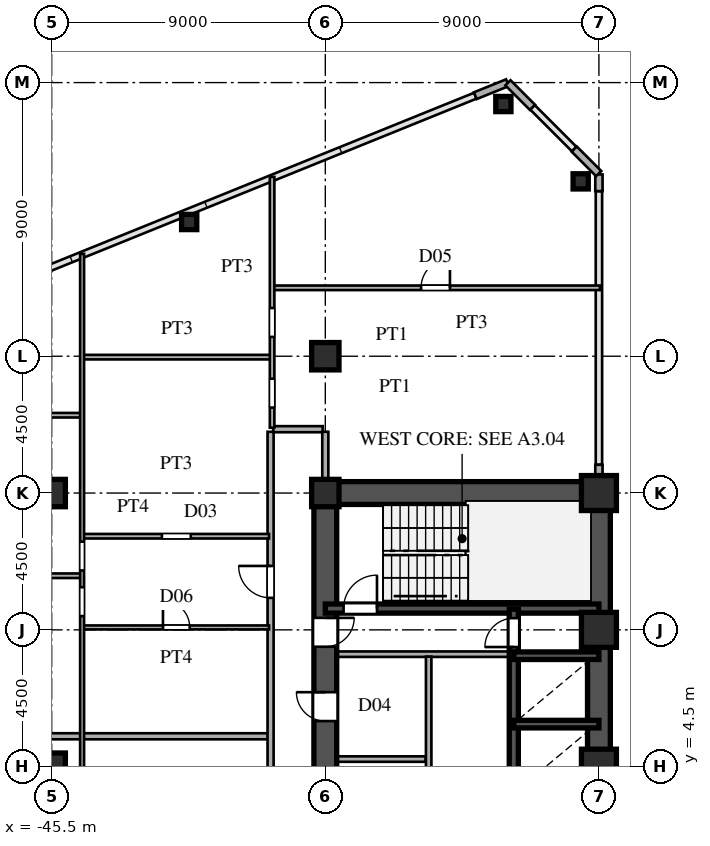
"""IFC4 building model, lengths in metres.
Left out: names, types, materials, properties, quantities, classifications, styles, units other than length and angle.
Written with IfcOpenShell. Run it as: python <this file> out.ifc"""

import sys

from ifc_helpers import new_model, si_unit, direction, frame, frame_2d, origin, origin_2d, place, context, subcontext, project, spatial, rectangle, hollow_rectangle, i_section, extrude, source, transform, mapped, element, fill, save


model = new_model("IFC4")
c1 = context("Model", 3, precision=1e-05, world=origin(), true_north=direction((0.0, 1.0)))
c2 = subcontext(c1, "Body", "Model", "MODEL_VIEW")
j1 = project(units=[si_unit("LENGTHUNIT", "METRE"), si_unit("PLANEANGLEUNIT", "RADIAN")], contexts=[c1])
p1 = place(None, origin())
s1 = spatial("IfcSite", under=j1, at=p1, CompositionType="ELEMENT")
p2 = place(p1, origin())
s2 = spatial("IfcBuilding", under=s1, at=p2, CompositionType="ELEMENT")
p3 = place(p2, frame((0.0, 0.0, 47.7)))
s3 = spatial("IfcBuildingStorey", under=s2, at=p3, CompositionType="ELEMENT", Elevation=47.7)
m1 = source(origin(), c2, "Body", "SweptSolid", [
    extrude(hollow_rectangle(XDim=1.15, YDim=1.15, WallThickness=0.048, at=origin_2d()), origin(), (0.0, 0.0, 1.0), 3.6),
])
for number, where, z_axis, x_axis in (
    (1, (-27.5, 4.5, 0.0), (0.0, 0.0, 1.0), (1.0, 0.0, 0.0)),
    (2, (-27.5, 9.0, 0.0), (0.0, 0.0, 1.0), (1.0, 0.0, 0.0)),
    (3, (-27.5, 13.5, 0.0), (0.0, 0.0, 1.0), (1.0, 0.0, 0.0)),
):
    element("IfcColumn", number, at=place(p3, frame(where, z_axis=z_axis, x_axis=x_axis)), inside=s3, PredefinedType="COLUMN", context=c2, shape_type="MappedRepresentation", body=[
        mapped(m1, transform((0.0, 0.0, 0.0), scale=1.0)),
    ])
m2 = source(origin(), c2, "Body", "SweptSolid", [
    extrude(i_section(OverallWidth=0.9, OverallDepth=0.9, WebThickness=0.036, FlangeThickness=0.055, at=origin_2d()), origin(), (0.0, 0.0, 1.0), 3.6),
])
for number, where, z_axis, x_axis in (
    (4, (-36.5, 13.5, 0.0), (0.0, 0.0, 1.0), (1.0, 0.0, 0.0)),
    (5, (-36.5, 18.0, 0.0), (0.0, 0.0, 1.0), (1.0, 0.0, 0.0)),
    (6, (-45.5, 4.5, 0.0), (0.0, 0.0, 1.0), (1.0, 0.0, 0.0)),
    (7, (-45.5, 13.5, 0.0), (0.0, 0.0, 1.0), (1.0, 0.0, 0.0)),
):
    element("IfcColumn", number, at=place(p3, frame(where, z_axis=z_axis, x_axis=x_axis)), inside=s3, PredefinedType="COLUMN", context=c2, shape_type="MappedRepresentation", body=[
        mapped(m2, transform((0.0, 0.0, 0.0), scale=1.0)),
    ])
m3 = source(origin(), c2, "Body", "SweptSolid", [
    extrude(hollow_rectangle(XDim=0.5, YDim=0.5, WallThickness=0.02, at=origin_2d()), origin(), (0.0, 0.0, 1.0), 3.6),
])
for number, where, z_axis, x_axis in (
    (8, (-28.1, 23.751, 0.0), (0.0, 0.0, 1.0), (1.0, 0.0, 0.0)),
    (9, (-30.643, 26.295, 0.0), (0.0, 0.0, 1.0), (1.0, 0.0, 0.0)),
    (10, (-40.977, 22.414, 0.0), (0.0, 0.0, 1.0), (1.0, 0.0, 0.0)),
):
    element("IfcColumn", number, at=place(p3, frame(where, z_axis=z_axis, x_axis=x_axis)), inside=s3, PredefinedType="COLUMN", context=c2, shape_type="MappedRepresentation", body=[
        mapped(m3, transform((0.0, 0.0, 0.0), scale=1.0)),
    ])
p4 = place(p3, frame((-27.5, 13.88, 0.0), z_axis=(0.0, 0.0, 1.0), x_axis=(0.0, 1.0, 0.0)))
e11 = element("IfcWall", 11, at=p4, inside=s3, PredefinedType="SOLIDWALL", context=c2, shape_type="SweptSolid", body=[
    extrude(rectangle(XDim=0.55, YDim=0.24, at=frame_2d((0.275, 0.0))), origin(), (0.0, 0.0, 1.0), 2.88),
])
p5 = place(p3, frame((-27.5, 23.43, 0.0), z_axis=(0.0, 0.0, 1.0), x_axis=(0.0, 1.0, 0.0)))
e12 = element("IfcWall", 12, at=p5, inside=s3, PredefinedType="SOLIDWALL", context=c2, shape_type="SweptSolid", body=[
    extrude(rectangle(XDim=0.55, YDim=0.24, at=frame_2d((0.275, 0.0))), origin(), (0.0, 0.0, 1.0), 3.38),
])
for number, where, z_axis, x_axis in (
    (13, (-27.507, 24.007, 0.0), (0.0, 0.0, 1.0), (-0.707, 0.707, 0.0)),
    (14, (-29.687, 26.187, 0.0), (0.0, 0.0, 1.0), (-0.707, 0.707, 0.0)),
):
    element("IfcWall", number, at=place(p3, frame(where, z_axis=z_axis, x_axis=x_axis)), inside=s3, PredefinedType="SOLIDWALL", context=c2, shape_type="SweptSolid", body=[
        extrude(rectangle(XDim=1.14, YDim=0.24, at=frame_2d((0.57, 0.0))), origin(), (0.0, 0.0, 1.0), 3.38),
    ])
p6 = place(p3, frame((-30.509, 26.996, 0.0), z_axis=(0.0, 0.0, 1.0), x_axis=(-0.927007103665, -0.375043770452, 0.0)))
e15 = element("IfcWall", 15, at=p6, inside=s3, PredefinedType="SOLIDWALL", context=c2, shape_type="SweptSolid", body=[
    extrude(rectangle(XDim=1.14, YDim=0.24, at=frame_2d((0.57, 0.0))), origin(), (0.0, 0.0, 1.0), 3.38),
])
p7 = place(p3, frame((-27.5, 1.3, 0.0), z_axis=(0.0, 0.0, 1.0), x_axis=(0.0, 1.0, 0.0)))
e16 = element("IfcWall", 16, at=p7, inside=s3, PredefinedType="SHEAR", context=c2, shape_type="SweptSolid", body=[
    extrude(rectangle(XDim=12.2, YDim=0.75, at=frame_2d((6.1, 0.0))), origin(), (0.0, 0.0, 1.0), 3.38),
])
p8 = place(p3, frame((-36.5, 13.5, 0.0), z_axis=(0.0, 0.0, 1.0), x_axis=(1.0, 0.0, 0.0)))
e17 = element("IfcWall", 17, at=p8, inside=s3, PredefinedType="SHEAR", context=c2, shape_type="SweptSolid", body=[
    extrude(rectangle(XDim=9.0, YDim=0.75, at=frame_2d((4.5, 0.0))), origin(), (0.0, 0.0, 1.0), 3.38),
])
p9 = place(p3, frame((-36.5, 8.2, 0.0), z_axis=(0.0, 0.0, 1.0), x_axis=(0.0, 1.0, 0.0)))
e18 = element("IfcWall", 18, at=p9, inside=s3, PredefinedType="SHEAR", context=c2, shape_type="SweptSolid", body=[
    extrude(rectangle(XDim=5.45, YDim=0.75, at=frame_2d((2.725, 0.0))), origin(), (0.0, 0.0, 1.0), 3.38),
])
p10 = place(p9, frame((0.245, 0.0, 0.0)))
e19 = element("IfcOpeningElement", 19, at=p10, cuts=e18, PredefinedType="OPENING", context=c2, shape_type="SweptSolid", body=[
    extrude(rectangle(XDim=0.95, YDim=2.15, at=frame_2d((0.475, 1.075))), frame((0.0, 0.385, 0.0), z_axis=(0.0, -1.0, 0.0), x_axis=(1.0, 0.0, 0.0)), (0.0, 0.0, 1.0), 0.77),
])
p11 = place(p3, frame((-36.5, 1.3, 0.0), z_axis=(0.0, 0.0, 1.0), x_axis=(0.0, 1.0, 0.0)))
e20 = element("IfcWall", 20, at=p11, inside=s3, PredefinedType="SHEAR", context=c2, shape_type="SweptSolid", body=[
    extrude(rectangle(XDim=3.45, YDim=0.75, at=frame_2d((1.725, 0.0))), origin(), (0.0, 0.0, 1.0), 3.38),
])
p12 = place(p11, frame((1.25, 0.0, 0.0)))
e21 = element("IfcOpeningElement", 21, at=p12, cuts=e20, PredefinedType="OPENING", context=c2, shape_type="SweptSolid", body=[
    extrude(rectangle(XDim=0.95, YDim=2.15, at=frame_2d((0.475, 1.075))), frame((0.0, 0.385, 0.0), z_axis=(0.0, -1.0, 0.0), x_axis=(1.0, 0.0, 0.0)), (0.0, 0.0, 1.0), 0.77),
])
p13 = place(p3, frame((-36.5, 4.75, 0.0), z_axis=(0.0, 0.0, 1.0), x_axis=(0.0, 1.0, 0.0)))
e22 = element("IfcWall", 22, at=p13, inside=s3, PredefinedType="SHEAR", context=c2, shape_type="SweptSolid", body=[
    extrude(rectangle(XDim=3.45, YDim=0.75, at=frame_2d((1.725, 0.0))), origin(), (0.0, 0.0, 1.0), 3.38),
])
p14 = place(p13, frame((1.25, 0.0, 0.0)))
e23 = element("IfcOpeningElement", 23, at=p14, cuts=e22, PredefinedType="OPENING", context=c2, shape_type="SweptSolid", body=[
    extrude(rectangle(XDim=0.95, YDim=2.15, at=frame_2d((0.475, 1.075))), frame((0.0, 0.385, 0.0), z_axis=(0.0, -1.0, 0.0), x_axis=(1.0, 0.0, 0.0)), (0.0, 0.0, 1.0), 0.77),
])
p15 = place(p3, frame((-36.5, 9.7, 0.0), z_axis=(0.0, 0.0, 1.0), x_axis=(1.0, 0.0, 0.0)))
e24 = element("IfcWall", 24, at=p15, inside=s3, PredefinedType="SHEAR", context=c2, shape_type="SweptSolid", body=[
    extrude(rectangle(XDim=9.0, YDim=0.3, at=frame_2d((4.5, 0.0))), origin(), (0.0, 0.0, 1.0), 3.38),
])
p16 = place(p15, frame((0.6, 0.0, 0.0)))
e25 = element("IfcOpeningElement", 25, at=p16, cuts=e24, PredefinedType="OPENING", context=c2, shape_type="SweptSolid", body=[
    extrude(rectangle(XDim=1.1, YDim=2.2, at=frame_2d((0.55, 1.1))), frame((0.0, 0.16, 0.0), z_axis=(0.0, -1.0, 0.0), x_axis=(1.0, 0.0, 0.0)), (0.0, 0.0, 1.0), 0.32),
])
for number, where, z_axis, x_axis in (
    (26, (-30.3, 5.9, 0.0), (0.0, 0.0, 1.0), (1.0, 0.0, 0.0)),
    (27, (-30.3, 8.15, 0.0), (0.0, 0.0, 1.0), (1.0, 0.0, 0.0)),
):
    element("IfcWall", number, at=place(p3, frame(where, z_axis=z_axis, x_axis=x_axis)), inside=s3, PredefinedType="SHEAR", context=c2, shape_type="SweptSolid", body=[
        extrude(rectangle(XDim=2.8, YDim=0.25, at=frame_2d((1.4, 0.0))), origin(), (0.0, 0.0, 1.0), 3.38),
    ])
p17 = place(p3, frame((-30.3, 3.6, 0.0), z_axis=(0.0, 0.0, 1.0), x_axis=(0.0, 1.0, 0.0)))
e28 = element("IfcWall", 28, at=p17, inside=s3, PredefinedType="SHEAR", context=c2, shape_type="SweptSolid", body=[
    extrude(rectangle(XDim=2.3, YDim=0.3, at=frame_2d((1.15, 0.0))), origin(), (0.0, 0.0, 1.0), 3.38),
])
p18 = place(p3, frame((-30.3, 5.9, 0.0), z_axis=(0.0, 0.0, 1.0), x_axis=(0.0, 1.0, 0.0)))
e29 = element("IfcWall", 29, at=p18, inside=s3, PredefinedType="SHEAR", context=c2, shape_type="SweptSolid", body=[
    extrude(rectangle(XDim=2.25, YDim=0.3, at=frame_2d((1.125, 0.0))), origin(), (0.0, 0.0, 1.0), 3.38),
])
p19 = place(p3, frame((-30.3, 8.15, 0.0), z_axis=(0.0, 0.0, 1.0), x_axis=(0.0, 1.0, 0.0)))
e30 = element("IfcWall", 30, at=p19, inside=s3, PredefinedType="SHEAR", context=c2, shape_type="SweptSolid", body=[
    extrude(rectangle(XDim=1.53, YDim=0.3, at=frame_2d((0.765, 0.0))), origin(), (0.0, 0.0, 1.0), 3.38),
])
p20 = place(p19, frame((0.285, 0.0, 0.0)))
e31 = element("IfcOpeningElement", 31, at=p20, cuts=e30, PredefinedType="OPENING", context=c2, shape_type="SweptSolid", body=[
    extrude(rectangle(XDim=0.95, YDim=2.15, at=frame_2d((0.475, 1.075))), frame((0.0, 0.16, 0.0), z_axis=(0.0, -1.0, 0.0), x_axis=(1.0, 0.0, 0.0)), (0.0, 0.0, 1.0), 0.32),
])
p21 = place(p3, frame((-36.15, 8.2, 0.0), z_axis=(0.0, 0.0, 1.0), x_axis=(1.0, 0.0, 0.0)))
e32 = element("IfcWall", 32, at=p21, inside=s3, PredefinedType="PARTITIONING", context=c2, shape_type="SweptSolid", body=[
    extrude(rectangle(XDim=5.7, YDim=0.18, at=frame_2d((2.85, 0.0))), origin(), (0.0, 0.0, 1.0), 3.38),
])
p22 = place(p3, frame((-33.1, 1.38, 0.0), z_axis=(0.0, 0.0, 1.0), x_axis=(0.0, 1.0, 0.0)))
e33 = element("IfcWall", 33, at=p22, inside=s3, PredefinedType="PARTITIONING", context=c2, shape_type="SweptSolid", body=[
    extrude(rectangle(XDim=6.74, YDim=0.18, at=frame_2d((3.37, 0.0))), origin(), (0.0, 0.0, 1.0), 3.38),
])
p23 = place(p3, frame((-36.15, 4.75, 0.0), z_axis=(0.0, 0.0, 1.0), x_axis=(1.0, 0.0, 0.0)))
e34 = element("IfcWall", 34, at=p23, inside=s3, PredefinedType="PARTITIONING", context=c2, shape_type="SweptSolid", body=[
    extrude(rectangle(XDim=2.95, YDim=0.18, at=frame_2d((1.475, 0.0))), origin(), (0.0, 0.0, 1.0), 3.38),
])
p24 = place(p3, frame((-72.505, 5.5, 0.0), z_axis=(0.0, 0.0, 1.0), x_axis=(1.0, 0.0, 0.0)))
e35 = element("IfcWall", 35, at=p24, inside=s3, PredefinedType="PARTITIONING", context=c2, shape_type="SweptSolid", body=[
    extrude(rectangle(XDim=34.125, YDim=0.2, at=frame_2d((17.062, 0.0))), origin(), (0.0, 0.0, 1.0), 3.38),
])
p25 = place(p3, frame((-44.45, 9.08, 0.0), z_axis=(0.0, 0.0, 1.0), x_axis=(1.0, 0.0, 0.0)))
e36 = element("IfcWall", 36, at=p25, inside=s3, PredefinedType="PARTITIONING", context=c2, shape_type="SweptSolid", body=[
    extrude(rectangle(XDim=6.1, YDim=0.13, at=frame_2d((3.05, 0.0))), origin(), (0.0, 0.0, 1.0), 3.38),
])
p26 = place(p25, frame((2.61, 0.0, 0.0)))
e37 = element("IfcOpeningElement", 37, at=p26, cuts=e36, PredefinedType="OPENING", context=c2, shape_type="SweptSolid", body=[
    extrude(rectangle(XDim=0.88, YDim=2.1, at=frame_2d((0.44, 1.05))), frame((0.0, 0.075, 0.0), z_axis=(0.0, -1.0, 0.0), x_axis=(1.0, 0.0, 0.0)), (0.0, 0.0, 1.0), 0.15),
])
p27 = place(p3, frame((-70.613, 10.78, 0.0), z_axis=(0.0, 0.0, 1.0), x_axis=(1.0, 0.0, 0.0)))
e38 = element("IfcWall", 38, at=p27, inside=s3, PredefinedType="PARTITIONING", context=c2, shape_type="SweptSolid", body=[
    extrude(rectangle(XDim=26.063, YDim=0.15, at=frame_2d((13.031, 0.0))), origin(), (0.0, 0.0, 1.0), 3.38),
])
p28 = place(p27, frame((4.749, 0.0, 0.0)))
e39 = element("IfcOpeningElement", 39, at=p28, cuts=e38, PredefinedType="OPENING", context=c2, shape_type="SweptSolid", body=[
    extrude(rectangle(XDim=0.95, YDim=2.15, at=frame_2d((0.475, 1.075))), frame((0.0, 0.085, 0.0), z_axis=(0.0, -1.0, 0.0), x_axis=(1.0, 0.0, 0.0)), (0.0, 0.0, 1.0), 0.17),
])
p29 = place(p3, frame((-44.45, 12.08, 0.0), z_axis=(0.0, 0.0, 1.0), x_axis=(1.0, 0.0, 0.0)))
e40 = element("IfcWall", 40, at=p29, inside=s3, PredefinedType="PARTITIONING", context=c2, shape_type="SweptSolid", body=[
    extrude(rectangle(XDim=6.1, YDim=0.15, at=frame_2d((3.05, 0.0))), origin(), (0.0, 0.0, 1.0), 3.38),
])
p30 = place(p29, frame((2.575, 0.0, 0.0)))
e41 = element("IfcOpeningElement", 41, at=p30, cuts=e40, PredefinedType="OPENING", context=c2, shape_type="SweptSolid", body=[
    extrude(rectangle(XDim=0.95, YDim=2.15, at=frame_2d((0.475, 1.075))), frame((0.0, 0.085, 0.0), z_axis=(0.0, -1.0, 0.0), x_axis=(1.0, 0.0, 0.0)), (0.0, 0.0, 1.0), 0.17),
])
p31 = place(p3, frame((-38.215, 15.6, 0.0), z_axis=(0.0, 0.0, 1.0), x_axis=(1.0, 0.0, 0.0)))
e42 = element("IfcWall", 42, at=p31, inside=s3, PredefinedType="PARTITIONING", context=c2, shape_type="SweptSolid", body=[
    extrude(rectangle(XDim=1.63, YDim=0.2, at=frame_2d((0.815, 0.0))), origin(), (0.0, 0.0, 1.0), 3.38),
])
p32 = place(p3, frame((-54.45, 16.06, 0.0), z_axis=(0.0, 0.0, 1.0), x_axis=(1.0, 0.0, 0.0)))
e43 = element("IfcWall", 43, at=p32, inside=s3, PredefinedType="PARTITIONING", context=c2, shape_type="SweptSolid", body=[
    extrude(rectangle(XDim=9.9, YDim=0.15, at=frame_2d((4.95, 0.0))), origin(), (0.0, 0.0, 1.0), 3.38),
])
p33 = place(p32, frame((4.475, 0.0, 0.0)))
e44 = element("IfcOpeningElement", 44, at=p33, cuts=e43, PredefinedType="OPENING", context=c2, shape_type="SweptSolid", body=[
    extrude(rectangle(XDim=0.95, YDim=2.15, at=frame_2d((0.475, 1.075))), frame((0.0, 0.085, 0.0), z_axis=(0.0, -1.0, 0.0), x_axis=(1.0, 0.0, 0.0)), (0.0, 0.0, 1.0), 0.17),
])
p34 = place(p3, frame((-44.45, 17.97, 0.0), z_axis=(0.0, 0.0, 1.0), x_axis=(1.0, 0.0, 0.0)))
e45 = element("IfcWall", 45, at=p34, inside=s3, PredefinedType="PARTITIONING", context=c2, shape_type="SweptSolid", body=[
    extrude(rectangle(XDim=6.15, YDim=0.15, at=frame_2d((3.075, 0.0))), origin(), (0.0, 0.0, 1.0), 3.38),
])
p35 = place(p3, frame((-38.2, 20.25, 0.0), z_axis=(0.0, 0.0, 1.0), x_axis=(1.0, 0.0, 0.0)))
e46 = element("IfcWall", 46, at=p35, inside=s3, PredefinedType="PARTITIONING", context=c2, shape_type="SweptSolid", body=[
    extrude(rectangle(XDim=10.735, YDim=0.15, at=frame_2d((5.367, 0.0))), origin(), (0.0, 0.0, 1.0), 3.38),
])
p36 = place(p35, frame((4.85, 0.0, 0.0)))
e47 = element("IfcOpeningElement", 47, at=p36, cuts=e46, PredefinedType="OPENING", context=c2, shape_type="SweptSolid", body=[
    extrude(rectangle(XDim=0.95, YDim=2.15, at=frame_2d((0.475, 1.075))), frame((0.0, 0.085, 0.0), z_axis=(0.0, -1.0, 0.0), x_axis=(1.0, 0.0, 0.0)), (0.0, 0.0, 1.0), 0.17),
])
p37 = place(p3, frame((-44.5, 1.352, 0.0), z_axis=(0.0, 0.0, 1.0), x_axis=(0.0, 1.0, 0.0)))
e48 = element("IfcWall", 48, at=p37, inside=s3, PredefinedType="PARTITIONING", context=c2, shape_type="SweptSolid", body=[
    extrude(rectangle(XDim=20.016, YDim=0.13, at=frame_2d((10.008, 0.0))), origin(), (0.0, 0.0, 1.0), 3.38),
])
p38 = place(p37, frame((8.101, 0.0, 0.0)))
e49 = element("IfcOpeningElement", 49, at=p38, cuts=e48, PredefinedType="OPENING", context=c2, shape_type="SweptSolid", body=[
    extrude(rectangle(XDim=0.95, YDim=2.15, at=frame_2d((0.475, 1.075))), frame((0.0, 0.075, 0.0), z_axis=(0.0, -1.0, 0.0), x_axis=(1.0, 0.0, 0.0)), (0.0, 0.0, 1.0), 0.15),
])
p39 = place(p37, frame((9.601, 0.0, 0.0)))
e50 = element("IfcOpeningElement", 50, at=p39, cuts=e48, PredefinedType="OPENING", context=c2, shape_type="SweptSolid", body=[
    extrude(rectangle(XDim=0.95, YDim=2.15, at=frame_2d((0.475, 1.075))), frame((0.0, 0.075, 0.0), z_axis=(0.0, -1.0, 0.0), x_axis=(1.0, 0.0, 0.0)), (0.0, 0.0, 1.0), 0.15),
])
p40 = place(p3, frame((-38.3, -15.515, 0.0), z_axis=(0.0, 0.0, 1.0), x_axis=(0.0, 1.0, 0.0)))
e51 = element("IfcWall", 51, at=p40, inside=s3, PredefinedType="PARTITIONING", context=c2, shape_type="SweptSolid", body=[
    extrude(rectangle(XDim=31.03, YDim=0.2, at=frame_2d((15.515, 0.0))), origin(), (0.0, 0.0, 1.0), 3.38),
])
p41 = place(p40, frame((2.345, 0.0, 0.0)))
e52 = element("IfcOpeningElement", 52, at=p41, cuts=e51, PredefinedType="OPENING", context=c2, shape_type="SweptSolid", body=[
    extrude(rectangle(XDim=1.05, YDim=2.25, at=frame_2d((0.525, 1.125))), frame((0.0, 0.11, 0.0), z_axis=(0.0, -1.0, 0.0), x_axis=(1.0, 0.0, 0.0)), (0.0, 0.0, 1.0), 0.22),
])
p42 = place(p40, frame((13.28, 0.0, 0.0)))
e53 = element("IfcOpeningElement", 53, at=p42, cuts=e51, PredefinedType="OPENING", context=c2, shape_type="SweptSolid", body=[
    extrude(rectangle(XDim=1.05, YDim=2.25, at=frame_2d((0.525, 1.125))), frame((0.0, 0.11, 0.0), z_axis=(0.0, -1.0, 0.0), x_axis=(1.0, 0.0, 0.0)), (0.0, 0.0, 1.0), 0.22),
])
p43 = place(p40, frame((25.567, 0.0, 0.0)))
e54 = element("IfcOpeningElement", 54, at=p43, cuts=e51, PredefinedType="OPENING", context=c2, shape_type="SweptSolid", body=[
    extrude(rectangle(XDim=1.05, YDim=2.25, at=frame_2d((0.525, 1.125))), frame((0.0, 0.11, 0.0), z_axis=(0.0, -1.0, 0.0), x_axis=(1.0, 0.0, 0.0)), (0.0, 0.0, 1.0), 0.22),
])
p44 = place(p3, frame((-38.25, 15.65, 0.0), z_axis=(0.0, 0.0, 1.0), x_axis=(0.0, 1.0, 0.0)))
e55 = element("IfcWall", 55, at=p44, inside=s3, PredefinedType="PARTITIONING", context=c2, shape_type="SweptSolid", body=[
    extrude(rectangle(XDim=8.248, YDim=0.15, at=frame_2d((4.124, 0.0))), origin(), (0.0, 0.0, 1.0), 3.38),
])
p45 = place(p44, frame((0.66, 0.0, 0.0)))
e56 = element("IfcOpeningElement", 56, at=p45, cuts=e55, PredefinedType="OPENING", context=c2, shape_type="SweptSolid", body=[
    extrude(rectangle(XDim=0.95, YDim=2.15, at=frame_2d((0.475, 1.075))), frame((0.0, 0.085, 0.0), z_axis=(0.0, -1.0, 0.0), x_axis=(1.0, 0.0, 0.0)), (0.0, 0.0, 1.0), 0.17),
])
p46 = place(p44, frame((2.985, 0.0, 0.0)))
e57 = element("IfcOpeningElement", 57, at=p46, cuts=e55, PredefinedType="OPENING", context=c2, shape_type="SweptSolid", body=[
    extrude(rectangle(XDim=0.95, YDim=2.15, at=frame_2d((0.475, 1.075))), frame((0.0, 0.085, 0.0), z_axis=(0.0, -1.0, 0.0), x_axis=(1.0, 0.0, 0.0)), (0.0, 0.0, 1.0), 0.17),
])
p47 = place(p3, frame((-36.5, 13.88, 0.0), z_axis=(0.0, 0.0, 1.0), x_axis=(0.0, 1.0, 0.0)))
e58 = element("IfcWall", 58, at=p47, inside=s3, PredefinedType="PARTITIONING", context=c2, shape_type="SweptSolid", body=[
    extrude(rectangle(XDim=1.635, YDim=0.2, at=frame_2d((0.817, 0.0))), origin(), (0.0, 0.0, 1.0), 2.68),
])
m4 = source(origin(), c2, "Body", "SweptSolid", [
    extrude(rectangle(XDim=0.95, YDim=2.15, at=frame_2d((0.475, 1.075))), frame((0.0, 0.025, 0.0), z_axis=(0.0, -1.0, 0.0), x_axis=(1.0, 0.0, 0.0)), (0.0, 0.0, 1.0), 0.05),
])
p48 = place(p10, frame((0.95, 0.0, 0.0), z_axis=(0.0, 0.0, 1.0), x_axis=(-1.0, 0.0, 0.0)))
e59 = element("IfcDoor", 59, at=p48, inside=s3, OperationType="SINGLE_SWING_RIGHT", PredefinedType="DOOR", context=c2, shape_type="MappedRepresentation", body=[
    mapped(m4, transform((0.0, 0.0, 0.0), scale=1.0)),
])
fill(e19, e59)
p49 = place(p14, origin())
e60 = element("IfcDoor", 60, at=p49, inside=s3, OperationType="SINGLE_SWING_RIGHT", PredefinedType="DOOR", context=c2, shape_type="MappedRepresentation", body=[
    mapped(m4, transform((0.0, 0.0, 0.0), scale=1.0)),
])
fill(e23, e60)
m5 = source(origin(), c2, "Body", "SweptSolid", [
    extrude(rectangle(XDim=1.1, YDim=2.2, at=frame_2d((0.55, 1.1))), frame((0.0, 0.025, 0.0), z_axis=(0.0, -1.0, 0.0), x_axis=(1.0, 0.0, 0.0)), (0.0, 0.0, 1.0), 0.05),
])
p50 = place(p16, origin())
e61 = element("IfcDoor", 61, at=p50, inside=s3, OperationType="SINGLE_SWING_RIGHT", PredefinedType="DOOR", context=c2, shape_type="MappedRepresentation", body=[
    mapped(m5, transform((0.0, 0.0, 0.0), scale=1.0)),
])
fill(e25, e61)
p51 = place(p20, origin())
e62 = element("IfcDoor", 62, at=p51, inside=s3, OperationType="SINGLE_SWING_LEFT", PredefinedType="DOOR", context=c2, shape_type="MappedRepresentation", body=[
    mapped(m4, transform((0.0, 0.0, 0.0), scale=1.0)),
])
fill(e31, e62)
m6 = source(origin(), c2, "Body", "SweptSolid", [
    extrude(rectangle(XDim=0.88, YDim=2.1, at=frame_2d((0.44, 1.05))), frame((0.0, 0.025, 0.0), z_axis=(0.0, -1.0, 0.0), x_axis=(1.0, 0.0, 0.0)), (0.0, 0.0, 1.0), 0.05),
])
p52 = place(p26, origin())
e63 = element("IfcDoor", 63, at=p52, inside=s3, OperationType="SINGLE_SWING_LEFT", PredefinedType="DOOR", context=c2, shape_type="MappedRepresentation", body=[
    mapped(m6, transform((0.0, 0.0, 0.0), scale=1.0)),
])
fill(e37, e63)
m7 = source(origin(), c2, "Body", "SweptSolid", [
    extrude(rectangle(XDim=0.95, YDim=2.15, at=frame_2d((0.475, 1.075))), frame((0.0, 0.025, 0.0), z_axis=(0.0, -1.0, 0.0), x_axis=(1.0, 0.0, 0.0)), (0.0, 0.0, 1.0), 0.05),
])
p53 = place(p36, origin())
e64 = element("IfcDoor", 64, at=p53, inside=s3, OperationType="SINGLE_SWING_RIGHT", PredefinedType="DOOR", context=c2, shape_type="MappedRepresentation", body=[
    mapped(m7, transform((0.0, 0.0, 0.0), scale=1.0)),
])
fill(e47, e64)
m8 = source(origin(), c2, "Body", "SweptSolid", [
    extrude(rectangle(XDim=1.05, YDim=2.25, at=frame_2d((0.525, 1.125))), frame((0.0, 0.025, 0.0), z_axis=(0.0, -1.0, 0.0), x_axis=(1.0, 0.0, 0.0)), (0.0, 0.0, 1.0), 0.05),
])
p54 = place(p43, origin())
e65 = element("IfcDoor", 65, at=p54, inside=s3, OperationType="SINGLE_SWING_RIGHT", PredefinedType="DOOR", context=c2, shape_type="MappedRepresentation", body=[
    mapped(m8, transform((0.0, 0.0, 0.0), scale=1.0)),
])
fill(e54, e65)
save(model, sys.argv[1])
